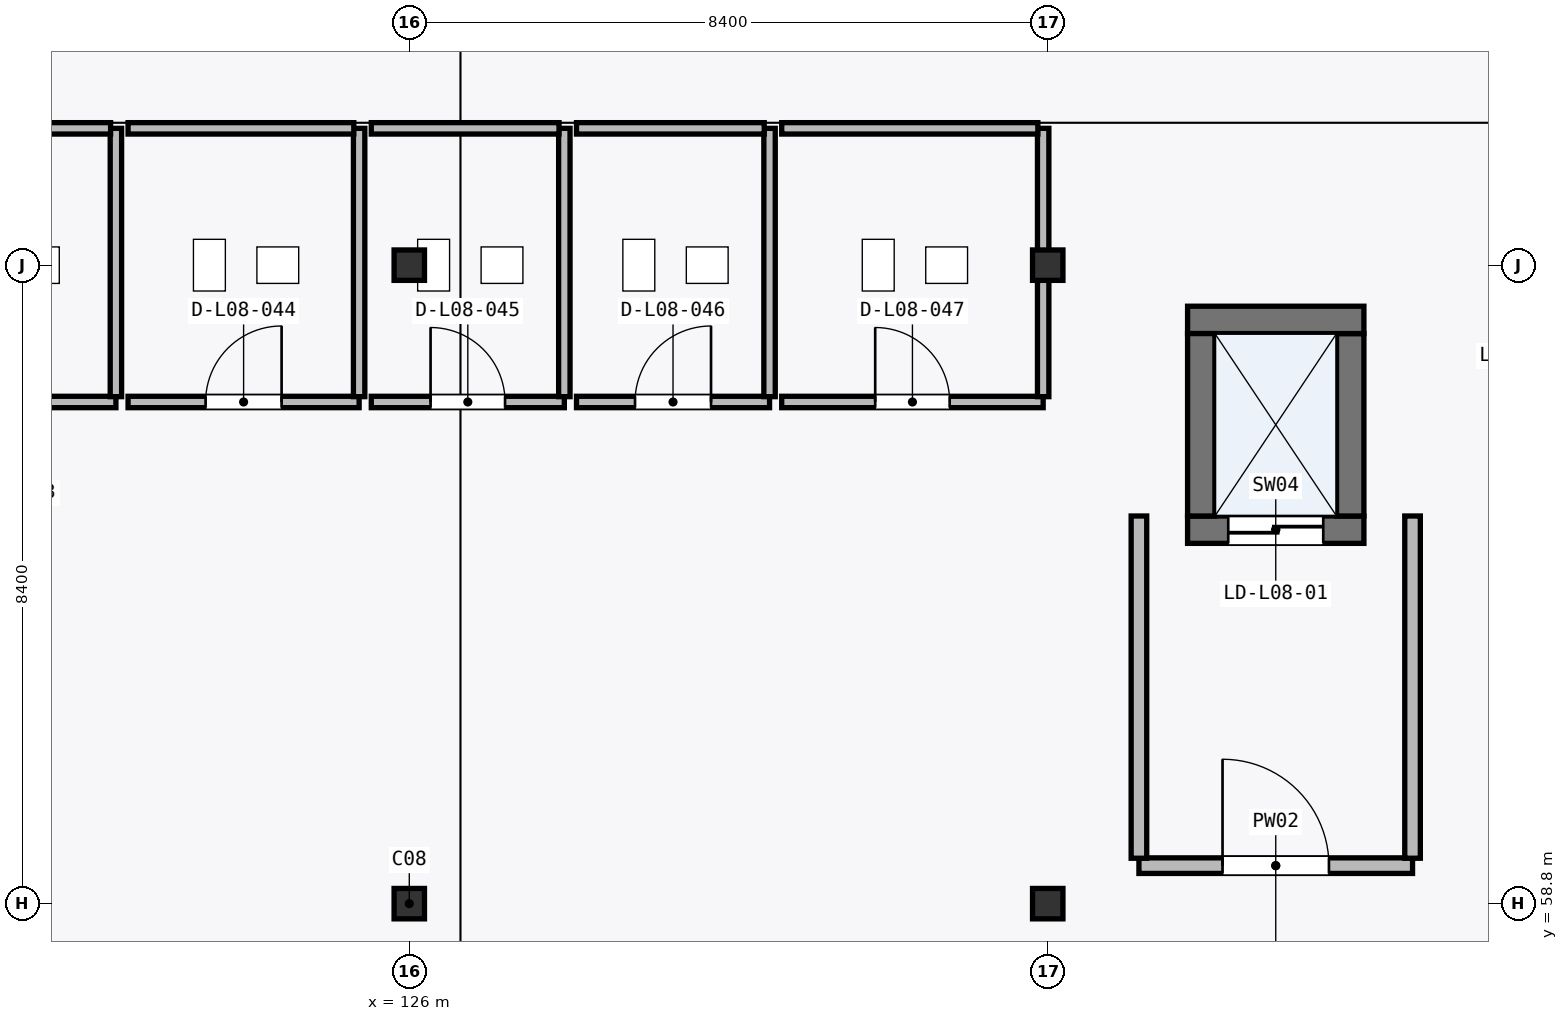
"""IFC4 building model, lengths in metres.
Left out: names, types, materials, properties, quantities, classifications, styles, units other than length and angle.
Written with IfcOpenShell. Run it as: python <this file> out.ifc"""

import sys

from ifc_helpers import new_model, si_unit, direction, frame, frame_2d, origin, origin_2d, place, context, subcontext, project, spatial, rectangle, hollow_rectangle, extrude, element, fill, save


model = new_model("IFC4")
c1 = context("Model", 3, precision=1e-05, world=origin(), true_north=direction((0.0, 1.0)))
c2 = subcontext(c1, "Body", "Model", "MODEL_VIEW")
j1 = project(units=[si_unit("LENGTHUNIT", "METRE"), si_unit("PLANEANGLEUNIT", "RADIAN")], contexts=[c1])
p1 = place(None, origin())
s1 = spatial("IfcSite", under=j1, at=p1, CompositionType="ELEMENT")
p2 = place(p1, origin())
s2 = spatial("IfcBuilding", under=s1, at=p2, CompositionType="ELEMENT")
p3 = place(p2, frame((0.0, 0.0, 36.3)))
s3 = spatial("IfcBuildingStorey", under=s2, at=p3, CompositionType="ELEMENT", Elevation=36.3)
for number, where, z_axis, x_axis in (
    (1, (126.0, 58.8, 0.0), (0.0, 0.0, 1.0), (1.0, 0.0, 0.0)),
    (2, (126.0, 67.2, 0.0), (0.0, 0.0, 1.0), (1.0, 0.0, 0.0)),
    (3, (134.4, 58.8, 0.0), (0.0, 0.0, 1.0), (1.0, 0.0, 0.0)),
    (4, (134.4, 67.2, 0.0), (0.0, 0.0, 1.0), (1.0, 0.0, 0.0)),
):
    element("IfcColumn", number, at=place(p3, frame(where, z_axis=z_axis, x_axis=x_axis)), inside=s3, PredefinedType="COLUMN", context=c2, shape_type="SweptSolid", body=[
        extrude(hollow_rectangle(XDim=0.4, YDim=0.4, WallThickness=0.016, at=origin_2d()), origin(), (0.0, 0.0, 1.0), 4.5),
    ])
p4 = place(p3, frame((136.24, 63.72, 0.0), z_axis=(0.0, 0.0, 1.0), x_axis=(1.0, 0.0, 0.0)))
e5 = element("IfcWall", 5, at=p4, inside=s3, PredefinedType="SHEAR", context=c2, shape_type="SweptSolid", body=[
    extrude(rectangle(XDim=2.32, YDim=0.36, at=frame_2d((1.16, 0.0))), origin(), (0.0, 0.0, 1.0), 3.495),
])
p5 = place(p4, frame((0.535, 0.0, 0.0)))
e6 = element("IfcOpeningElement", 6, at=p5, cuts=e5, PredefinedType="OPENING", context=c2, shape_type="SweptSolid", body=[
    extrude(rectangle(XDim=1.25, YDim=2.2, at=frame_2d((0.625, 1.1))), frame((0.0, 0.19, 0.0), z_axis=(0.0, -1.0, 0.0), x_axis=(1.0, 0.0, 0.0)), (0.0, 0.0, 1.0), 0.38),
])
p6 = place(p3, frame((138.38, 63.9, 0.0), z_axis=(0.0, 0.0, 1.0), x_axis=(0.0, 1.0, 0.0)))
e7 = element("IfcWall", 7, at=p6, inside=s3, PredefinedType="SHEAR", context=c2, shape_type="SweptSolid", body=[
    extrude(rectangle(XDim=2.4, YDim=0.36, at=frame_2d((1.2, 0.0))), origin(), (0.0, 0.0, 1.0), 3.495),
])
p7 = place(p3, frame((138.56, 66.48, 0.0), z_axis=(0.0, 0.0, 1.0), x_axis=(-1.0, 0.0, 0.0)))
e8 = element("IfcWall", 8, at=p7, inside=s3, PredefinedType="SHEAR", context=c2, shape_type="SweptSolid", body=[
    extrude(rectangle(XDim=2.32, YDim=0.36, at=frame_2d((1.16, 0.0))), origin(), (0.0, 0.0, 1.0), 3.495),
])
p8 = place(p3, frame((136.42, 66.3, 0.0), z_axis=(0.0, 0.0, 1.0), x_axis=(0.0, -1.0, 0.0)))
e9 = element("IfcWall", 9, at=p8, inside=s3, PredefinedType="SHEAR", context=c2, shape_type="SweptSolid", body=[
    extrude(rectangle(XDim=2.4, YDim=0.36, at=frame_2d((1.2, 0.0))), origin(), (0.0, 0.0, 1.0), 3.495),
])
p9 = place(p3, frame((135.6, 59.3, 0.0), z_axis=(0.0, 0.0, 1.0), x_axis=(1.0, 0.0, 0.0)))
e10 = element("IfcWall", 10, at=p9, inside=s3, PredefinedType="PARTITIONING", context=c2, shape_type="SweptSolid", body=[
    extrude(rectangle(XDim=3.6, YDim=0.205, at=frame_2d((1.8, 0.0))), origin(), (0.0, 0.0, 1.0), 4.245),
])
p10 = place(p9, frame((1.1, 0.0, 0.0)))
e11 = element("IfcOpeningElement", 11, at=p10, cuts=e10, PredefinedType="OPENING", context=c2, shape_type="SweptSolid", body=[
    extrude(rectangle(XDim=1.4, YDim=2.15, at=frame_2d((0.7, 1.075))), frame((0.0, 0.113, 0.0), z_axis=(0.0, -1.0, 0.0), x_axis=(1.0, 0.0, 0.0)), (0.0, 0.0, 1.0), 0.225),
])
for number, where, z_axis, x_axis in (
    (12, (139.2, 59.397, 0.0), (0.0, 0.0, 1.0), (0.0, 1.0, 0.0)),
    (13, (135.6, 63.9, 0.0), (0.0, 0.0, 1.0), (0.0, -1.0, 0.0)),
):
    element("IfcWall", number, at=place(p3, frame(where, z_axis=z_axis, x_axis=x_axis)), inside=s3, PredefinedType="PARTITIONING", context=c2, shape_type="SweptSolid", body=[
        extrude(rectangle(XDim=4.502, YDim=0.205, at=frame_2d((2.251, 0.0))), origin(), (0.0, 0.0, 1.0), 4.245),
    ])
p11 = place(p3, frame((119.2, 65.4, 0.0), z_axis=(0.0, 0.0, 1.0), x_axis=(1.0, 0.0, 0.0)))
e14 = element("IfcWall", 14, at=p11, inside=s3, PredefinedType="PARTITIONING", context=c2, shape_type="SweptSolid", body=[
    extrude(rectangle(XDim=2.94, YDim=0.15, at=frame_2d((1.47, 0.0))), origin(), (0.0, 0.0, 1.0), 4.245),
])
p12 = place(p11, frame((0.97, 0.0, 0.0)))
e15 = element("IfcOpeningElement", 15, at=p12, cuts=e14, PredefinedType="OPENING", context=c2, shape_type="SweptSolid", body=[
    extrude(rectangle(XDim=1.0, YDim=2.1, at=frame_2d((0.5, 1.05))), frame((0.0, 0.085, 0.0), z_axis=(0.0, -1.0, 0.0), x_axis=(1.0, 0.0, 0.0)), (0.0, 0.0, 1.0), 0.17),
])
p13 = place(p3, frame((122.14, 65.47, 0.0), z_axis=(0.0, 0.0, 1.0), x_axis=(0.0, 1.0, 0.0)))
e16 = element("IfcWall", 16, at=p13, inside=s3, PredefinedType="PARTITIONING", context=c2, shape_type="SweptSolid", body=[
    extrude(rectangle(XDim=3.53, YDim=0.15, at=frame_2d((1.765, 0.0))), origin(), (0.0, 0.0, 1.0), 4.245),
])
p14 = place(p3, frame((122.07, 69.0, 0.0), z_axis=(0.0, 0.0, 1.0), x_axis=(-1.0, 0.0, 0.0)))
e17 = element("IfcWall", 17, at=p14, inside=s3, PredefinedType="PARTITIONING", context=c2, shape_type="SweptSolid", body=[
    extrude(rectangle(XDim=2.87, YDim=0.15, at=frame_2d((1.435, 0.0))), origin(), (0.0, 0.0, 1.0), 4.245),
])
p15 = place(p3, frame((122.3, 65.4, 0.0), z_axis=(0.0, 0.0, 1.0), x_axis=(1.0, 0.0, 0.0)))
e18 = element("IfcWall", 18, at=p15, inside=s3, PredefinedType="PARTITIONING", context=c2, shape_type="SweptSolid", body=[
    extrude(rectangle(XDim=3.04, YDim=0.15, at=frame_2d((1.52, 0.0))), origin(), (0.0, 0.0, 1.0), 4.245),
])
p16 = place(p15, frame((1.02, 0.0, 0.0)))
e19 = element("IfcOpeningElement", 19, at=p16, cuts=e18, PredefinedType="OPENING", context=c2, shape_type="SweptSolid", body=[
    extrude(rectangle(XDim=1.0, YDim=2.1, at=frame_2d((0.5, 1.05))), frame((0.0, 0.085, 0.0), z_axis=(0.0, -1.0, 0.0), x_axis=(1.0, 0.0, 0.0)), (0.0, 0.0, 1.0), 0.17),
])
p17 = place(p3, frame((125.34, 65.47, 0.0), z_axis=(0.0, 0.0, 1.0), x_axis=(0.0, 1.0, 0.0)))
e20 = element("IfcWall", 20, at=p17, inside=s3, PredefinedType="PARTITIONING", context=c2, shape_type="SweptSolid", body=[
    extrude(rectangle(XDim=3.53, YDim=0.15, at=frame_2d((1.765, 0.0))), origin(), (0.0, 0.0, 1.0), 4.245),
])
p18 = place(p3, frame((125.27, 69.0, 0.0), z_axis=(0.0, 0.0, 1.0), x_axis=(-1.0, 0.0, 0.0)))
e21 = element("IfcWall", 21, at=p18, inside=s3, PredefinedType="PARTITIONING", context=c2, shape_type="SweptSolid", body=[
    extrude(rectangle(XDim=2.97, YDim=0.15, at=frame_2d((1.485, 0.0))), origin(), (0.0, 0.0, 1.0), 4.245),
])
p19 = place(p3, frame((125.5, 65.4, 0.0), z_axis=(0.0, 0.0, 1.0), x_axis=(1.0, 0.0, 0.0)))
e22 = element("IfcWall", 22, at=p19, inside=s3, PredefinedType="PARTITIONING", context=c2, shape_type="SweptSolid", body=[
    extrude(rectangle(XDim=2.54, YDim=0.15, at=frame_2d((1.27, 0.0))), origin(), (0.0, 0.0, 1.0), 4.245),
])
p20 = place(p19, frame((0.78, 0.0, 0.0)))
e23 = element("IfcOpeningElement", 23, at=p20, cuts=e22, PredefinedType="OPENING", context=c2, shape_type="SweptSolid", body=[
    extrude(rectangle(XDim=0.98, YDim=2.1, at=frame_2d((0.49, 1.05))), frame((0.0, 0.085, 0.0), z_axis=(0.0, -1.0, 0.0), x_axis=(1.0, 0.0, 0.0)), (0.0, 0.0, 1.0), 0.17),
])
p21 = place(p3, frame((128.04, 65.47, 0.0), z_axis=(0.0, 0.0, 1.0), x_axis=(0.0, 1.0, 0.0)))
e24 = element("IfcWall", 24, at=p21, inside=s3, PredefinedType="PARTITIONING", context=c2, shape_type="SweptSolid", body=[
    extrude(rectangle(XDim=3.53, YDim=0.15, at=frame_2d((1.765, 0.0))), origin(), (0.0, 0.0, 1.0), 4.245),
])
p22 = place(p3, frame((127.97, 69.0, 0.0), z_axis=(0.0, 0.0, 1.0), x_axis=(-1.0, 0.0, 0.0)))
e25 = element("IfcWall", 25, at=p22, inside=s3, PredefinedType="PARTITIONING", context=c2, shape_type="SweptSolid", body=[
    extrude(rectangle(XDim=2.47, YDim=0.15, at=frame_2d((1.235, 0.0))), origin(), (0.0, 0.0, 1.0), 4.245),
])
p23 = place(p3, frame((128.2, 65.4, 0.0), z_axis=(0.0, 0.0, 1.0), x_axis=(1.0, 0.0, 0.0)))
e26 = element("IfcWall", 26, at=p23, inside=s3, PredefinedType="PARTITIONING", context=c2, shape_type="SweptSolid", body=[
    extrude(rectangle(XDim=2.54, YDim=0.15, at=frame_2d((1.27, 0.0))), origin(), (0.0, 0.0, 1.0), 4.245),
])
p24 = place(p23, frame((0.77, 0.0, 0.0)))
e27 = element("IfcOpeningElement", 27, at=p24, cuts=e26, PredefinedType="OPENING", context=c2, shape_type="SweptSolid", body=[
    extrude(rectangle(XDim=1.0, YDim=2.1, at=frame_2d((0.5, 1.05))), frame((0.0, 0.085, 0.0), z_axis=(0.0, -1.0, 0.0), x_axis=(1.0, 0.0, 0.0)), (0.0, 0.0, 1.0), 0.17),
])
p25 = place(p3, frame((130.74, 65.47, 0.0), z_axis=(0.0, 0.0, 1.0), x_axis=(0.0, 1.0, 0.0)))
e28 = element("IfcWall", 28, at=p25, inside=s3, PredefinedType="PARTITIONING", context=c2, shape_type="SweptSolid", body=[
    extrude(rectangle(XDim=3.53, YDim=0.15, at=frame_2d((1.765, 0.0))), origin(), (0.0, 0.0, 1.0), 4.245),
])
p26 = place(p3, frame((130.67, 69.0, 0.0), z_axis=(0.0, 0.0, 1.0), x_axis=(-1.0, 0.0, 0.0)))
e29 = element("IfcWall", 29, at=p26, inside=s3, PredefinedType="PARTITIONING", context=c2, shape_type="SweptSolid", body=[
    extrude(rectangle(XDim=2.47, YDim=0.15, at=frame_2d((1.235, 0.0))), origin(), (0.0, 0.0, 1.0), 4.245),
])
p27 = place(p3, frame((130.9, 65.4, 0.0), z_axis=(0.0, 0.0, 1.0), x_axis=(1.0, 0.0, 0.0)))
e30 = element("IfcWall", 30, at=p27, inside=s3, PredefinedType="PARTITIONING", context=c2, shape_type="SweptSolid", body=[
    extrude(rectangle(XDim=3.44, YDim=0.15, at=frame_2d((1.72, 0.0))), origin(), (0.0, 0.0, 1.0), 4.245),
])
p28 = place(p27, frame((1.23, 0.0, 0.0)))
e31 = element("IfcOpeningElement", 31, at=p28, cuts=e30, PredefinedType="OPENING", context=c2, shape_type="SweptSolid", body=[
    extrude(rectangle(XDim=0.98, YDim=2.1, at=frame_2d((0.49, 1.05))), frame((0.0, 0.085, 0.0), z_axis=(0.0, -1.0, 0.0), x_axis=(1.0, 0.0, 0.0)), (0.0, 0.0, 1.0), 0.17),
])
p29 = place(p3, frame((134.34, 65.47, 0.0), z_axis=(0.0, 0.0, 1.0), x_axis=(0.0, 1.0, 0.0)))
e32 = element("IfcWall", 32, at=p29, inside=s3, PredefinedType="PARTITIONING", context=c2, shape_type="SweptSolid", body=[
    extrude(rectangle(XDim=3.53, YDim=0.15, at=frame_2d((1.765, 0.0))), origin(), (0.0, 0.0, 1.0), 3.347),
])
p30 = place(p3, frame((134.27, 69.0, 0.0), z_axis=(0.0, 0.0, 1.0), x_axis=(-1.0, 0.0, 0.0)))
e33 = element("IfcWall", 33, at=p30, inside=s3, PredefinedType="PARTITIONING", context=c2, shape_type="SweptSolid", body=[
    extrude(rectangle(XDim=3.37, YDim=0.15, at=frame_2d((1.685, 0.0))), origin(), (0.0, 0.0, 1.0), 4.245),
])
p31 = place(p5, frame((1.25, 0.0, 0.0), z_axis=(0.0, 0.0, 1.0), x_axis=(-1.0, 0.0, 0.0)))
e34 = element("IfcDoor", 34, at=p31, inside=s3, OperationType="DOUBLE_DOOR_SLIDING", PredefinedType="DOOR", context=c2, shape_type="SweptSolid", body=[
    extrude(rectangle(XDim=1.25, YDim=2.2, at=frame_2d((0.625, 1.1))), frame((0.0, 0.025, 0.0), z_axis=(0.0, -1.0, 0.0), x_axis=(1.0, 0.0, 0.0)), (0.0, 0.0, 1.0), 0.05),
])
fill(e6, e34)
p32 = place(p10, origin())
e35 = element("IfcDoor", 35, at=p32, inside=s3, OperationType="SINGLE_SWING_LEFT", PredefinedType="DOOR", context=c2, shape_type="SweptSolid", body=[
    extrude(rectangle(XDim=1.4, YDim=2.15, at=frame_2d((0.7, 1.075))), frame((0.0, 0.025, 0.0), z_axis=(0.0, -1.0, 0.0), x_axis=(1.0, 0.0, 0.0)), (0.0, 0.0, 1.0), 0.05),
])
fill(e11, e35)
p33 = place(p16, origin())
e36 = element("IfcDoor", 36, at=p33, inside=s3, OperationType="SINGLE_SWING_RIGHT", PredefinedType="DOOR", context=c2, shape_type="SweptSolid", body=[
    extrude(rectangle(XDim=1.0, YDim=2.1, at=frame_2d((0.5, 1.05))), frame((0.0, 0.025, 0.0), z_axis=(0.0, -1.0, 0.0), x_axis=(1.0, 0.0, 0.0)), (0.0, 0.0, 1.0), 0.05),
])
fill(e19, e36)
p34 = place(p20, origin())
e37 = element("IfcDoor", 37, at=p34, inside=s3, OperationType="SINGLE_SWING_LEFT", PredefinedType="DOOR", context=c2, shape_type="SweptSolid", body=[
    extrude(rectangle(XDim=0.98, YDim=2.1, at=frame_2d((0.49, 1.05))), frame((0.0, 0.025, 0.0), z_axis=(0.0, -1.0, 0.0), x_axis=(1.0, 0.0, 0.0)), (0.0, 0.0, 1.0), 0.05),
])
fill(e23, e37)
p35 = place(p24, origin())
e38 = element("IfcDoor", 38, at=p35, inside=s3, OperationType="SINGLE_SWING_RIGHT", PredefinedType="DOOR", context=c2, shape_type="SweptSolid", body=[
    extrude(rectangle(XDim=1.0, YDim=2.1, at=frame_2d((0.5, 1.05))), frame((0.0, 0.025, 0.0), z_axis=(0.0, -1.0, 0.0), x_axis=(1.0, 0.0, 0.0)), (0.0, 0.0, 1.0), 0.05),
])
fill(e27, e38)
p36 = place(p28, origin())
e39 = element("IfcDoor", 39, at=p36, inside=s3, OperationType="SINGLE_SWING_LEFT", PredefinedType="DOOR", context=c2, shape_type="SweptSolid", body=[
    extrude(rectangle(XDim=0.98, YDim=2.1, at=frame_2d((0.49, 1.05))), frame((0.0, 0.025, 0.0), z_axis=(0.0, -1.0, 0.0), x_axis=(1.0, 0.0, 0.0)), (0.0, 0.0, 1.0), 0.05),
])
fill(e31, e39)
save(model, sys.argv[1])
